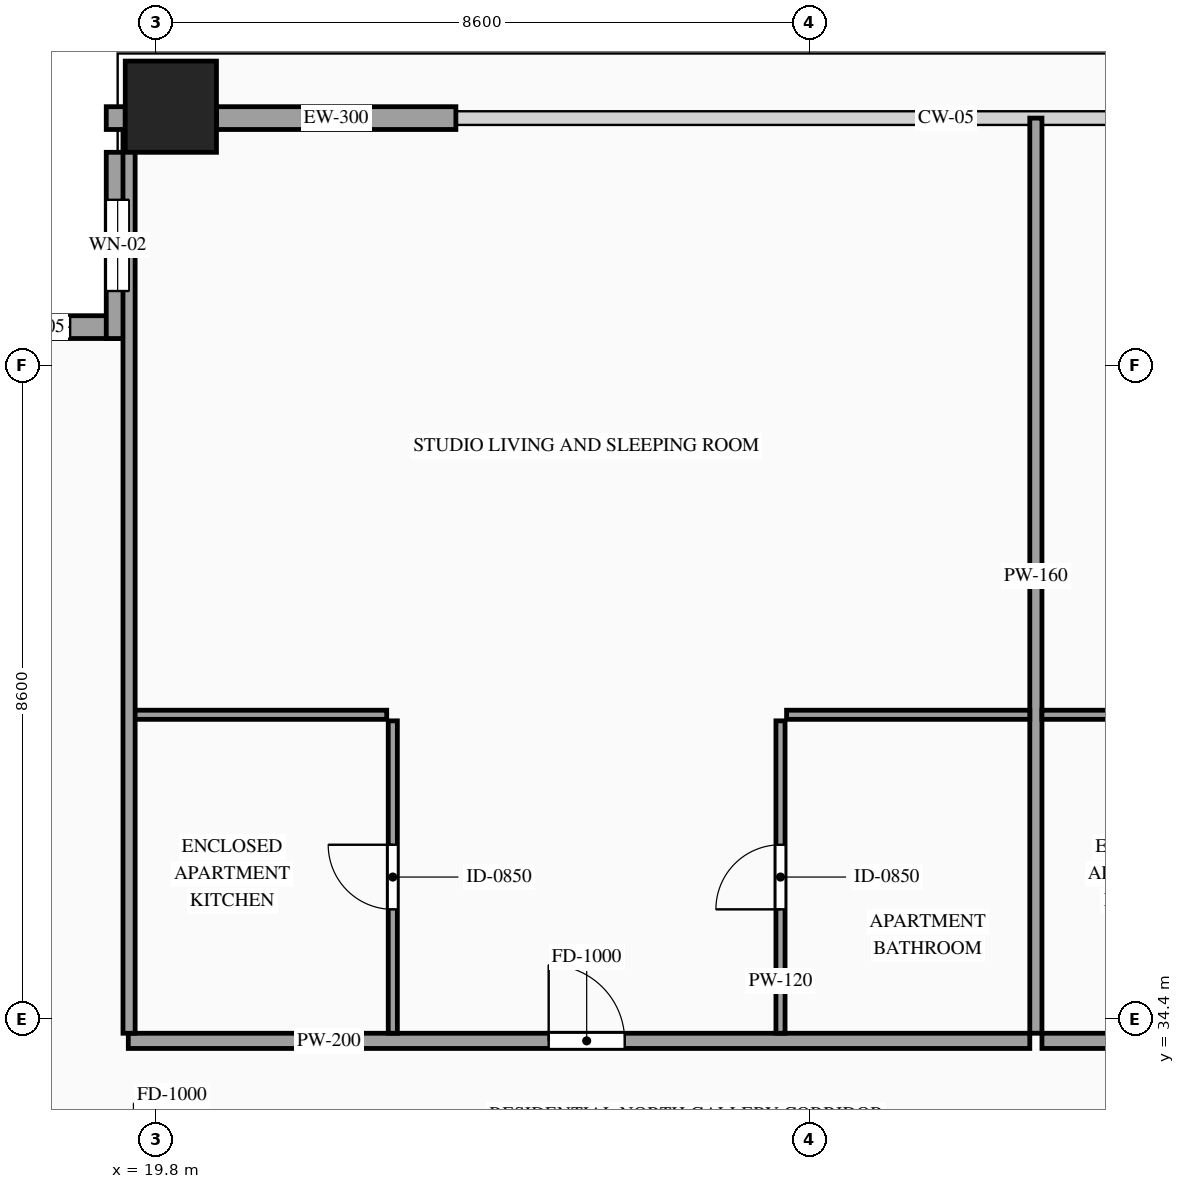
"""IFC4 building model, lengths in metres.
Left out: names, types, materials, properties, quantities, classifications, styles, units other than length and angle.
Written with IfcOpenShell. Run it as: python <this file> out.ifc"""

import sys

from ifc_helpers import new_model, si_unit, direction, frame, frame_2d, origin, origin_2d, place, context, subcontext, project, spatial, rectangle, hollow_rectangle, extrude, source, transform, mapped, element, fill, save


model = new_model("IFC4")
c1 = context("Model", 3, precision=1e-05, world=origin(), true_north=direction((0.0, 1.0)))
c2 = subcontext(c1, "Body", "Model", "MODEL_VIEW")
j1 = project(units=[si_unit("LENGTHUNIT", "METRE"), si_unit("PLANEANGLEUNIT", "RADIAN")], contexts=[c1])
p1 = place(None, origin())
s1 = spatial("IfcSite", under=j1, at=p1, CompositionType="ELEMENT")
p2 = place(p1, origin())
s2 = spatial("IfcBuilding", under=s1, at=p2, CompositionType="ELEMENT")
p3 = place(p2, frame((0.0, 0.0, 241.6)))
s3 = spatial("IfcBuildingStorey", under=s2, at=p3, CompositionType="ELEMENT", Elevation=241.6)
m1 = source(origin(), c2, "Body", "SweptSolid", [
    extrude(hollow_rectangle(XDim=1.2, YDim=1.2, WallThickness=0.055, at=origin_2d()), origin(), (0.0, 0.0, 1.0), 3.5),
])
p4 = place(p3, frame((20.0, 46.4, 0.0), z_axis=(0.0, 0.0, 1.0), x_axis=(1.0, 0.0, 0.0)))
e1 = element("IfcColumn", 1, at=p4, inside=s3, PredefinedType="COLUMN", context=c2, shape_type="MappedRepresentation", body=[
    mapped(m1, transform((0.0, 0.0, 0.0), scale=1.0)),
])
p5 = place(p3, frame((19.45, 43.5, 0.0), z_axis=(0.0, 0.0, 1.0), x_axis=(-1.0, 0.0, 0.0)))
e2 = element("IfcWall", 2, at=p5, inside=s3, PredefinedType="SOLIDWALL", context=c2, shape_type="SweptSolid", body=[
    extrude(rectangle(XDim=2.45, YDim=0.3, at=frame_2d((1.225, 0.0))), origin(), (0.0, 0.0, 1.0), 3.28),
])
p6 = place(p5, frame((0.775, 0.0, 0.85)))
e3 = element("IfcOpeningElement", 3, at=p6, cuts=e2, PredefinedType="OPENING", context=c2, shape_type="SweptSolid", body=[
    extrude(rectangle(XDim=0.9, YDim=1.5, at=frame_2d((0.45, 0.75))), frame((0.0, 0.165, 0.0), z_axis=(0.0, -1.0, 0.0), x_axis=(1.0, 0.0, 0.0)), (0.0, 0.0, 1.0), 0.33),
])
p7 = place(p3, frame((19.3, 45.8, 0.0), z_axis=(0.0, 0.0, 1.0), x_axis=(0.0, -1.0, 0.0)))
e4 = element("IfcWall", 4, at=p7, inside=s3, PredefinedType="SOLIDWALL", context=c2, shape_type="SweptSolid", body=[
    extrude(rectangle(XDim=2.45, YDim=0.3, at=frame_2d((1.225, 0.0))), origin(), (0.0, 0.0, 1.0), 3.28),
])
p8 = place(p7, frame((0.625, 0.0, 0.85)))
e5 = element("IfcOpeningElement", 5, at=p8, cuts=e4, PredefinedType="OPENING", context=c2, shape_type="SweptSolid", body=[
    extrude(rectangle(XDim=1.2, YDim=2.1, at=frame_2d((0.6, 1.05))), frame((0.0, 0.165, 0.0), z_axis=(0.0, -1.0, 0.0), x_axis=(1.0, 0.0, 0.0)), (0.0, 0.0, 1.0), 0.33),
])
m2 = source(origin(), c2, "Body", "SweptSolid", [
    extrude(rectangle(XDim=0.25, YDim=0.3, at=frame_2d((0.125, 0.0))), origin(), (0.0, 0.0, 1.0), 3.28),
])
p9 = place(p3, frame((19.15, 46.25, 0.0), z_axis=(0.0, 0.0, 1.0), x_axis=(1.0, 0.0, 0.0)))
e6 = element("IfcWall", 6, at=p9, inside=s3, PredefinedType="SOLIDWALL", context=c2, shape_type="MappedRepresentation", body=[
    mapped(m2, transform((0.0, 0.0, 0.0), scale=1.0)),
])
m3 = source(origin(), c2, "Body", "SweptSolid", [
    extrude(rectangle(XDim=3.15, YDim=0.3, at=frame_2d((1.575, 0.0))), origin(), (0.0, 0.0, 1.0), 2.835),
])
p10 = place(p3, frame((20.6, 46.25, 0.0), z_axis=(0.0, 0.0, 1.0), x_axis=(1.0, 0.0, 0.0)))
e7 = element("IfcWall", 7, at=p10, inside=s3, PredefinedType="SOLIDWALL", context=c2, shape_type="MappedRepresentation", body=[
    mapped(m3, transform((0.0, 0.0, 0.0), scale=1.0)),
])
p11 = place(p3, frame((19.44, 34.11, 0.0), z_axis=(0.0, 0.0, 1.0), x_axis=(1.0, 0.0, 0.0)))
e8 = element("IfcWall", 8, at=p11, inside=s3, PredefinedType="PARTITIONING", context=c2, shape_type="SweptSolid", body=[
    extrude(rectangle(XDim=11.861, YDim=0.2, at=frame_2d((5.931, 0.0))), origin(), (0.0, 0.0, 1.0), 3.28),
])
p12 = place(p11, frame((5.531, 0.0, 0.0)))
e9 = element("IfcOpeningElement", 9, at=p12, cuts=e8, PredefinedType="OPENING", context=c2, shape_type="SweptSolid", body=[
    extrude(rectangle(XDim=1.0, YDim=2.2, at=frame_2d((0.5, 1.1))), frame((0.0, 0.115, 0.0), z_axis=(0.0, -1.0, 0.0), x_axis=(1.0, 0.0, 0.0)), (0.0, 0.0, 1.0), 0.23),
])
m4 = source(origin(), c2, "Body", "SweptSolid", [
    extrude(rectangle(XDim=12.04, YDim=0.16, at=frame_2d((6.02, 0.0))), origin(), (0.0, 0.0, 1.0), 3.28),
])
p13 = place(p3, frame((31.381, 34.21, 0.0), z_axis=(0.0, 0.0, 1.0), x_axis=(0.0, 1.0, 0.0)))
e10 = element("IfcWall", 10, at=p13, inside=s3, PredefinedType="PARTITIONING", context=c2, shape_type="MappedRepresentation", body=[
    mapped(m4, transform((0.0, 0.0, 0.0), scale=1.0)),
])
m5 = source(origin(), c2, "Body", "SweptSolid", [
    extrude(rectangle(XDim=3.4, YDim=0.12, at=frame_2d((1.7, 0.0))), origin(), (0.0, 0.0, 1.0), 3.28),
])
p14 = place(p3, frame((19.44, 38.4, 0.0), z_axis=(0.0, 0.0, 1.0), x_axis=(1.0, 0.0, 0.0)))
e11 = element("IfcWall", 11, at=p14, inside=s3, PredefinedType="PARTITIONING", context=c2, shape_type="MappedRepresentation", body=[
    mapped(m5, transform((0.0, 0.0, 0.0), scale=1.0)),
])
p15 = place(p3, frame((22.92, 34.21, 0.0), z_axis=(0.0, 0.0, 1.0), x_axis=(0.0, 1.0, 0.0)))
e12 = element("IfcWall", 12, at=p15, inside=s3, PredefinedType="PARTITIONING", context=c2, shape_type="SweptSolid", body=[
    extrude(rectangle(XDim=4.11, YDim=0.12, at=frame_2d((2.055, 0.0))), origin(), (0.0, 0.0, 1.0), 3.28),
])
p16 = place(p15, frame((1.63, 0.0, 0.0)))
e13 = element("IfcOpeningElement", 13, at=p16, cuts=e12, PredefinedType="OPENING", context=c2, shape_type="SweptSolid", body=[
    extrude(rectangle(XDim=0.85, YDim=2.1, at=frame_2d((0.425, 1.05))), frame((0.0, 0.075, 0.0), z_axis=(0.0, -1.0, 0.0), x_axis=(1.0, 0.0, 0.0)), (0.0, 0.0, 1.0), 0.15),
])
m6 = source(origin(), c2, "Body", "SweptSolid", [
    extrude(rectangle(XDim=3.2, YDim=0.12, at=frame_2d((1.6, 0.0))), origin(), (0.0, 0.0, 1.0), 3.28),
])
p17 = place(p3, frame((28.101, 38.4, 0.0), z_axis=(0.0, 0.0, 1.0), x_axis=(1.0, 0.0, 0.0)))
e14 = element("IfcWall", 14, at=p17, inside=s3, PredefinedType="PARTITIONING", context=c2, shape_type="MappedRepresentation", body=[
    mapped(m6, transform((0.0, 0.0, 0.0), scale=1.0)),
])
p18 = place(p3, frame((28.021, 34.21, 0.0), z_axis=(0.0, 0.0, 1.0), x_axis=(0.0, 1.0, 0.0)))
e15 = element("IfcWall", 15, at=p18, inside=s3, PredefinedType="PARTITIONING", context=c2, shape_type="SweptSolid", body=[
    extrude(rectangle(XDim=4.11, YDim=0.12, at=frame_2d((2.055, 0.0))), origin(), (0.0, 0.0, 1.0), 3.28),
])
p19 = place(p18, frame((1.63, 0.0, 0.0)))
e16 = element("IfcOpeningElement", 16, at=p19, cuts=e15, PredefinedType="OPENING", context=c2, shape_type="SweptSolid", body=[
    extrude(rectangle(XDim=0.85, YDim=2.1, at=frame_2d((0.425, 1.05))), frame((0.0, 0.075, 0.0), z_axis=(0.0, -1.0, 0.0), x_axis=(1.0, 0.0, 0.0)), (0.0, 0.0, 1.0), 0.15),
])
p20 = place(p3, frame((31.461, 34.11, 0.0), z_axis=(0.0, 0.0, 1.0), x_axis=(1.0, 0.0, 0.0)))
e17 = element("IfcWall", 17, at=p20, inside=s3, PredefinedType="PARTITIONING", context=c2, shape_type="SweptSolid", body=[
    extrude(rectangle(XDim=11.429, YDim=0.2, at=frame_2d((5.714, 0.0))), origin(), (0.0, 0.0, 1.0), 3.28),
])
p21 = place(p20, frame((5.314, 0.0, 0.0)))
e18 = element("IfcOpeningElement", 18, at=p21, cuts=e17, PredefinedType="OPENING", context=c2, shape_type="SweptSolid", body=[
    extrude(rectangle(XDim=1.0, YDim=2.2, at=frame_2d((0.5, 1.1))), frame((0.0, 0.115, 0.0), z_axis=(0.0, -1.0, 0.0), x_axis=(1.0, 0.0, 0.0)), (0.0, 0.0, 1.0), 0.23),
])
p22 = place(p3, frame((31.461, 38.4, 0.0), z_axis=(0.0, 0.0, 1.0), x_axis=(1.0, 0.0, 0.0)))
e19 = element("IfcWall", 19, at=p22, inside=s3, PredefinedType="PARTITIONING", context=c2, shape_type="MappedRepresentation", body=[
    mapped(m5, transform((0.0, 0.0, 0.0), scale=1.0)),
])
m7 = source(origin(), c2, "Body", "SweptSolid", [
    extrude(rectangle(XDim=11.89, YDim=0.16, at=frame_2d((5.945, 0.0))), origin(), (0.0, 0.0, 1.0), 3.28),
])
p23 = place(p3, frame((19.45, 34.21, 0.0), z_axis=(0.0, 0.0, 1.0), x_axis=(0.0, 1.0, 0.0)))
e20 = element("IfcWall", 20, at=p23, inside=s3, PredefinedType="PARTITIONING", context=c2, shape_type="MappedRepresentation", body=[
    mapped(m7, transform((0.0, 0.0, 0.0), scale=1.0)),
])
m8 = source(origin(), c2, "Body", "SweptSolid", [
    extrude(rectangle(XDim=0.9, YDim=1.5, at=frame_2d((0.45, 0.75))), frame((0.0, 0.03, 0.0), z_axis=(0.0, -1.0, 0.0), x_axis=(1.0, 0.0, 0.0)), (0.0, 0.0, 1.0), 0.06),
])
p24 = place(p6, origin())
e21 = element("IfcWindow", 21, at=p24, inside=s3, PartitioningType="SINGLE_PANEL", PredefinedType="WINDOW", context=c2, shape_type="MappedRepresentation", body=[
    mapped(m8, transform((0.0, 0.0, 0.0), scale=1.0)),
])
fill(e3, e21)
m9 = source(origin(), c2, "Body", "SweptSolid", [
    extrude(rectangle(XDim=1.2, YDim=2.1, at=frame_2d((0.6, 1.05))), frame((0.0, 0.03, 0.0), z_axis=(0.0, -1.0, 0.0), x_axis=(1.0, 0.0, 0.0)), (0.0, 0.0, 1.0), 0.06),
])
p25 = place(p8, origin())
e22 = element("IfcWindow", 22, at=p25, inside=s3, PartitioningType="SINGLE_PANEL", PredefinedType="WINDOW", context=c2, shape_type="MappedRepresentation", body=[
    mapped(m9, transform((0.0, 0.0, 0.0), scale=1.0)),
])
fill(e5, e22)
m10 = source(origin(), c2, "Body", "SweptSolid", [
    extrude(rectangle(XDim=1.0, YDim=2.2, at=frame_2d((0.5, 1.1))), frame((0.0, 0.025, 0.0), z_axis=(0.0, -1.0, 0.0), x_axis=(1.0, 0.0, 0.0)), (0.0, 0.0, 1.0), 0.05),
])
p26 = place(p12, origin())
e23 = element("IfcDoor", 23, at=p26, inside=s3, OperationType="SINGLE_SWING_LEFT", PredefinedType="DOOR", context=c2, shape_type="MappedRepresentation", body=[
    mapped(m10, transform((0.0, 0.0, 0.0), scale=1.0)),
])
fill(e9, e23)
m11 = source(origin(), c2, "Body", "SweptSolid", [
    extrude(rectangle(XDim=0.85, YDim=2.1, at=frame_2d((0.425, 1.05))), frame((0.0, 0.025, 0.0), z_axis=(0.0, -1.0, 0.0), x_axis=(1.0, 0.0, 0.0)), (0.0, 0.0, 1.0), 0.05),
])
p27 = place(p16, origin())
e24 = element("IfcDoor", 24, at=p27, inside=s3, OperationType="SINGLE_SWING_RIGHT", PredefinedType="DOOR", context=c2, shape_type="MappedRepresentation", body=[
    mapped(m11, transform((0.0, 0.0, 0.0), scale=1.0)),
])
fill(e13, e24)
p28 = place(p19, origin())
e25 = element("IfcDoor", 25, at=p28, inside=s3, OperationType="SINGLE_SWING_LEFT", PredefinedType="DOOR", context=c2, shape_type="MappedRepresentation", body=[
    mapped(m11, transform((0.0, 0.0, 0.0), scale=1.0)),
])
fill(e16, e25)
save(model, sys.argv[1])
